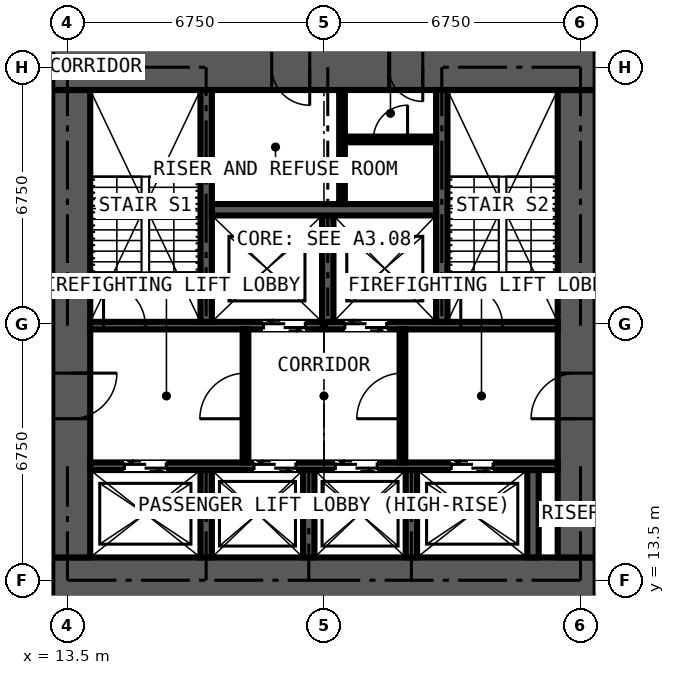
"""IFC4 building model, lengths in metres.
Left out: names, types, materials, properties, quantities, classifications, styles, units other than length and angle.
Written with IfcOpenShell. Run it as: python <this file> out.ifc"""

import sys

from ifc_helpers import new_model, si_unit, direction, frame, frame_2d, origin, place, context, subcontext, project, spatial, rectangle, extrude, element, fill, save


model = new_model("IFC4")
c1 = context("Model", 3, precision=1e-05, world=origin(), true_north=direction((0.0, 1.0)))
c2 = subcontext(c1, "Body", "Model", "MODEL_VIEW")
j1 = project(units=[si_unit("LENGTHUNIT", "METRE"), si_unit("PLANEANGLEUNIT", "RADIAN")], contexts=[c1])
p1 = place(None, origin())
s1 = spatial("IfcSite", under=j1, at=p1, CompositionType="ELEMENT")
p2 = place(p1, origin())
s2 = spatial("IfcBuilding", under=s1, at=p2, CompositionType="ELEMENT")
p3 = place(p2, frame((0.0, 0.0, 192.6)))
s3 = spatial("IfcBuildingStorey", under=s2, at=p3, CompositionType="ELEMENT", Elevation=192.6)
p4 = place(p3, frame((13.1, 13.5, 0.0), z_axis=(0.0, 0.0, 1.0), x_axis=(1.0, 0.0, 0.0)))
e1 = element("IfcWall", 1, at=p4, inside=s3, PredefinedType="SHEAR", context=c2, shape_type="SweptSolid", body=[
    extrude(rectangle(XDim=14.3, YDim=1.2, at=frame_2d((7.15, 0.0))), origin(), (0.0, 0.0, 1.0), 3.6),
])
p5 = place(p3, frame((26.9, 14.1, 0.0), z_axis=(0.0, 0.0, 1.0), x_axis=(0.0, 1.0, 0.0)))
e2 = element("IfcWall", 2, at=p5, inside=s3, PredefinedType="SHEAR", context=c2, shape_type="SweptSolid", body=[
    extrude(rectangle(XDim=12.3, YDim=1.0, at=frame_2d((6.15, 0.0))), origin(), (0.0, 0.0, 1.0), 3.6),
])
p6 = place(p5, frame((3.65, 0.0, 0.0)))
e3 = element("IfcOpeningElement", 3, at=p6, cuts=e2, PredefinedType="OPENING", context=c2, shape_type="SweptSolid", body=[
    extrude(rectangle(XDim=1.2, YDim=2.2, at=frame_2d((0.6, 1.1))), frame((0.0, 0.51, 0.0), z_axis=(0.0, -1.0, 0.0), x_axis=(1.0, 0.0, 0.0)), (0.0, 0.0, 1.0), 1.02),
])
p7 = place(p3, frame((27.4, 27.0, 0.0), z_axis=(0.0, 0.0, 1.0), x_axis=(-1.0, 0.0, 0.0)))
e4 = element("IfcWall", 4, at=p7, inside=s3, PredefinedType="SHEAR", context=c2, shape_type="SweptSolid", body=[
    extrude(rectangle(XDim=14.3, YDim=1.2, at=frame_2d((7.15, 0.0))), origin(), (0.0, 0.0, 1.0), 3.6),
])
p8 = place(p7, frame((4.55, 0.0, 0.0)))
e5 = element("IfcOpeningElement", 5, at=p8, cuts=e4, PredefinedType="OPENING", context=c2, shape_type="SweptSolid", body=[
    extrude(rectangle(XDim=0.9, YDim=2.2, at=frame_2d((0.45, 1.1))), frame((0.0, 0.61, 0.0), z_axis=(0.0, -1.0, 0.0), x_axis=(1.0, 0.0, 0.0)), (0.0, 0.0, 1.0), 1.22),
])
p9 = place(p7, frame((7.525, 0.0, 0.0)))
e6 = element("IfcOpeningElement", 6, at=p9, cuts=e4, PredefinedType="OPENING", context=c2, shape_type="SweptSolid", body=[
    extrude(rectangle(XDim=1.0, YDim=2.2, at=frame_2d((0.5, 1.1))), frame((0.0, 0.61, 0.0), z_axis=(0.0, -1.0, 0.0), x_axis=(1.0, 0.0, 0.0)), (0.0, 0.0, 1.0), 1.22),
])
p10 = place(p3, frame((13.6, 26.4, 0.0), z_axis=(0.0, 0.0, 1.0), x_axis=(0.0, -1.0, 0.0)))
e7 = element("IfcWall", 7, at=p10, inside=s3, PredefinedType="SHEAR", context=c2, shape_type="SweptSolid", body=[
    extrude(rectangle(XDim=12.3, YDim=1.0, at=frame_2d((6.15, 0.0))), origin(), (0.0, 0.0, 1.0), 3.6),
])
p11 = place(p10, frame((7.45, 0.0, 0.0)))
e8 = element("IfcOpeningElement", 8, at=p11, cuts=e7, PredefinedType="OPENING", context=c2, shape_type="SweptSolid", body=[
    extrude(rectangle(XDim=1.2, YDim=2.2, at=frame_2d((0.6, 1.1))), frame((0.0, 0.51, 0.0), z_axis=(0.0, -1.0, 0.0), x_axis=(1.0, 0.0, 0.0)), (0.0, 0.0, 1.0), 1.02),
])
p12 = place(p3, frame((14.1, 16.5, 0.0), z_axis=(0.0, 0.0, 1.0), x_axis=(1.0, 0.0, 0.0)))
e9 = element("IfcWall", 9, at=p12, inside=s3, PredefinedType="SHEAR", context=c2, shape_type="SweptSolid", body=[
    extrude(rectangle(XDim=12.3, YDim=0.2, at=frame_2d((6.15, 0.0))), origin(), (0.0, 0.0, 1.0), 3.6),
])
p13 = place(p12, frame((0.9, 0.0, 0.0)))
e10 = element("IfcOpeningElement", 10, at=p13, cuts=e9, PredefinedType="OPENING", context=c2, shape_type="SweptSolid", body=[
    extrude(rectangle(XDim=1.1, YDim=2.2, at=frame_2d((0.55, 1.1))), frame((0.0, 0.11, 0.0), z_axis=(0.0, -1.0, 0.0), x_axis=(1.0, 0.0, 0.0)), (0.0, 0.0, 1.0), 0.22),
])
p14 = place(p12, frame((4.31, 0.0, 0.0)))
e11 = element("IfcOpeningElement", 11, at=p14, cuts=e9, PredefinedType="OPENING", context=c2, shape_type="SweptSolid", body=[
    extrude(rectangle(XDim=1.1, YDim=2.2, at=frame_2d((0.55, 1.1))), frame((0.0, 0.11, 0.0), z_axis=(0.0, -1.0, 0.0), x_axis=(1.0, 0.0, 0.0)), (0.0, 0.0, 1.0), 0.22),
])
p15 = place(p12, frame((6.45, 0.0, 0.0)))
e12 = element("IfcOpeningElement", 12, at=p15, cuts=e9, PredefinedType="OPENING", context=c2, shape_type="SweptSolid", body=[
    extrude(rectangle(XDim=1.1, YDim=2.2, at=frame_2d((0.55, 1.1))), frame((0.0, 0.11, 0.0), z_axis=(0.0, -1.0, 0.0), x_axis=(1.0, 0.0, 0.0)), (0.0, 0.0, 1.0), 0.22),
])
p16 = place(p12, frame((9.5, 0.0, 0.0)))
e13 = element("IfcOpeningElement", 13, at=p16, cuts=e9, PredefinedType="OPENING", context=c2, shape_type="SweptSolid", body=[
    extrude(rectangle(XDim=1.1, YDim=2.2, at=frame_2d((0.55, 1.1))), frame((0.0, 0.11, 0.0), z_axis=(0.0, -1.0, 0.0), x_axis=(1.0, 0.0, 0.0)), (0.0, 0.0, 1.0), 0.22),
])
p17 = place(p3, frame((14.1, 20.2, 0.0), z_axis=(0.0, 0.0, 1.0), x_axis=(1.0, 0.0, 0.0)))
e14 = element("IfcWall", 14, at=p17, inside=s3, PredefinedType="SHEAR", context=c2, shape_type="SweptSolid", body=[
    extrude(rectangle(XDim=12.3, YDim=0.2, at=frame_2d((6.15, 0.0))), origin(), (0.0, 0.0, 1.0), 3.6),
])
p18 = place(p17, frame((4.56, 0.0, 0.0)))
e15 = element("IfcOpeningElement", 15, at=p18, cuts=e14, PredefinedType="OPENING", context=c2, shape_type="SweptSolid", body=[
    extrude(rectangle(XDim=1.1, YDim=2.2, at=frame_2d((0.55, 1.1))), frame((0.0, 0.11, 0.0), z_axis=(0.0, -1.0, 0.0), x_axis=(1.0, 0.0, 0.0)), (0.0, 0.0, 1.0), 0.22),
])
p19 = place(p17, frame((6.7, 0.0, 0.0)))
e16 = element("IfcOpeningElement", 16, at=p19, cuts=e14, PredefinedType="OPENING", context=c2, shape_type="SweptSolid", body=[
    extrude(rectangle(XDim=1.1, YDim=2.2, at=frame_2d((0.55, 1.1))), frame((0.0, 0.11, 0.0), z_axis=(0.0, -1.0, 0.0), x_axis=(1.0, 0.0, 0.0)), (0.0, 0.0, 1.0), 0.22),
])
p20 = place(p17, frame((0.35, 0.0, 0.0)))
e17 = element("IfcOpeningElement", 17, at=p20, cuts=e14, PredefinedType="OPENING", context=c2, shape_type="SweptSolid", body=[
    extrude(rectangle(XDim=1.1, YDim=2.2, at=frame_2d((0.55, 1.1))), frame((0.0, 0.11, 0.0), z_axis=(0.0, -1.0, 0.0), x_axis=(1.0, 0.0, 0.0)), (0.0, 0.0, 1.0), 0.22),
])
p21 = place(p17, frame((9.75, 0.0, 0.0)))
e18 = element("IfcOpeningElement", 18, at=p21, cuts=e14, PredefinedType="OPENING", context=c2, shape_type="SweptSolid", body=[
    extrude(rectangle(XDim=1.1, YDim=2.2, at=frame_2d((0.55, 1.1))), frame((0.0, 0.11, 0.0), z_axis=(0.0, -1.0, 0.0), x_axis=(1.0, 0.0, 0.0)), (0.0, 0.0, 1.0), 0.22),
])
for number, where, z_axis, x_axis in (
    (19, (17.15, 20.3, 0.0), (0.0, 0.0, 1.0), (0.0, 1.0, 0.0)),
    (20, (23.35, 20.3, 0.0), (0.0, 0.0, 1.0), (0.0, 1.0, 0.0)),
):
    element("IfcWall", number, at=place(p3, frame(where, z_axis=z_axis, x_axis=x_axis)), inside=s3, PredefinedType="SHEAR", context=c2, shape_type="SweptSolid", body=[
        extrude(rectangle(XDim=6.1, YDim=0.3, at=frame_2d((3.05, 0.0))), origin(), (0.0, 0.0, 1.0), 3.6),
    ])
p22 = place(p3, frame((20.35, 20.3, 0.0), z_axis=(0.0, 0.0, 1.0), x_axis=(0.0, 1.0, 0.0)))
e21 = element("IfcWall", 21, at=p22, inside=s3, PredefinedType="SHEAR", context=c2, shape_type="SweptSolid", body=[
    extrude(rectangle(XDim=2.8, YDim=0.3, at=frame_2d((1.4, 0.0))), origin(), (0.0, 0.0, 1.0), 3.6),
])
p23 = place(p3, frame((17.3, 23.25, 0.0), z_axis=(0.0, 0.0, 1.0), x_axis=(1.0, 0.0, 0.0)))
e22 = element("IfcWall", 22, at=p23, inside=s3, PredefinedType="SHEAR", context=c2, shape_type="SweptSolid", body=[
    extrude(rectangle(XDim=5.9, YDim=0.3, at=frame_2d((2.95, 0.0))), origin(), (0.0, 0.0, 1.0), 3.6),
])
for number, where, z_axis, x_axis in (
    (23, (17.15, 14.1, 0.0), (0.0, 0.0, 1.0), (0.0, 1.0, 0.0)),
    (24, (19.85, 14.1, 0.0), (0.0, 0.0, 1.0), (0.0, 1.0, 0.0)),
    (25, (22.55, 14.1, 0.0), (0.0, 0.0, 1.0), (0.0, 1.0, 0.0)),
    (26, (25.75, 14.1, 0.0), (0.0, 0.0, 1.0), (0.0, 1.0, 0.0)),
):
    element("IfcWall", number, at=place(p3, frame(where, z_axis=z_axis, x_axis=x_axis)), inside=s3, PredefinedType="SHEAR", context=c2, shape_type="SweptSolid", body=[
        extrude(rectangle(XDim=2.3, YDim=0.3, at=frame_2d((1.15, 0.0))), origin(), (0.0, 0.0, 1.0), 3.6),
    ])
p24 = place(p3, frame((18.185, 16.6, 0.0), z_axis=(0.0, 0.0, 1.0), x_axis=(0.0, 1.0, 0.0)))
e27 = element("IfcWall", 27, at=p24, inside=s3, PredefinedType="PARTITIONING", context=c2, shape_type="SweptSolid", body=[
    extrude(rectangle(XDim=3.5, YDim=0.15, at=frame_2d((1.75, 0.0))), origin(), (0.0, 0.0, 1.0), 3.375),
])
p25 = place(p24, frame((1.15, 0.0, 0.0)))
e28 = element("IfcOpeningElement", 28, at=p25, cuts=e27, PredefinedType="OPENING", context=c2, shape_type="SweptSolid", body=[
    extrude(rectangle(XDim=1.2, YDim=2.2, at=frame_2d((0.6, 1.1))), frame((0.0, 0.085, 0.0), z_axis=(0.0, -1.0, 0.0), x_axis=(1.0, 0.0, 0.0)), (0.0, 0.0, 1.0), 0.17),
])
p26 = place(p3, frame((22.315, 16.6, 0.0), z_axis=(0.0, 0.0, 1.0), x_axis=(0.0, 1.0, 0.0)))
e29 = element("IfcWall", 29, at=p26, inside=s3, PredefinedType="PARTITIONING", context=c2, shape_type="SweptSolid", body=[
    extrude(rectangle(XDim=3.5, YDim=0.15, at=frame_2d((1.75, 0.0))), origin(), (0.0, 0.0, 1.0), 3.375),
])
p27 = place(p26, frame((1.15, 0.0, 0.0)))
e30 = element("IfcOpeningElement", 30, at=p27, cuts=e29, PredefinedType="OPENING", context=c2, shape_type="SweptSolid", body=[
    extrude(rectangle(XDim=1.2, YDim=2.2, at=frame_2d((0.6, 1.1))), frame((0.0, 0.085, 0.0), z_axis=(0.0, -1.0, 0.0), x_axis=(1.0, 0.0, 0.0)), (0.0, 0.0, 1.0), 0.17),
])
p28 = place(p3, frame((20.725, 23.4, 0.0), z_axis=(0.0, 0.0, 1.0), x_axis=(0.0, 1.0, 0.0)))
e31 = element("IfcWall", 31, at=p28, inside=s3, PredefinedType="PARTITIONING", context=c2, shape_type="SweptSolid", body=[
    extrude(rectangle(XDim=3.0, YDim=0.15, at=frame_2d((1.5, 0.0))), origin(), (0.0, 0.0, 1.0), 3.375),
])
p29 = place(p3, frame((20.8, 25.1, 0.0), z_axis=(0.0, 0.0, 1.0), x_axis=(1.0, 0.0, 0.0)))
e32 = element("IfcWall", 32, at=p29, inside=s3, PredefinedType="PARTITIONING", context=c2, shape_type="SweptSolid", body=[
    extrude(rectangle(XDim=2.4, YDim=0.15, at=frame_2d((1.2, 0.0))), origin(), (0.0, 0.0, 1.0), 3.375),
])
p30 = place(p29, frame((0.75, 0.0, 0.0)))
e33 = element("IfcOpeningElement", 33, at=p30, cuts=e32, PredefinedType="OPENING", context=c2, shape_type="SweptSolid", body=[
    extrude(rectangle(XDim=0.9, YDim=2.2, at=frame_2d((0.45, 1.1))), frame((0.0, 0.085, 0.0), z_axis=(0.0, -1.0, 0.0), x_axis=(1.0, 0.0, 0.0)), (0.0, 0.0, 1.0), 0.17),
])
p31 = place(p13, origin())
e34 = element("IfcDoor", 34, at=p31, inside=s3, OperationType="DOUBLE_DOOR_SLIDING", PredefinedType="DOOR", context=c2, shape_type="SweptSolid", body=[
    extrude(rectangle(XDim=1.1, YDim=2.2, at=frame_2d((0.55, 1.1))), frame((0.0, 0.025, 0.0), z_axis=(0.0, -1.0, 0.0), x_axis=(1.0, 0.0, 0.0)), (0.0, 0.0, 1.0), 0.05),
])
fill(e10, e34)
p32 = place(p14, origin())
e35 = element("IfcDoor", 35, at=p32, inside=s3, OperationType="DOUBLE_DOOR_SLIDING", PredefinedType="DOOR", context=c2, shape_type="SweptSolid", body=[
    extrude(rectangle(XDim=1.1, YDim=2.2, at=frame_2d((0.55, 1.1))), frame((0.0, 0.025, 0.0), z_axis=(0.0, -1.0, 0.0), x_axis=(1.0, 0.0, 0.0)), (0.0, 0.0, 1.0), 0.05),
])
fill(e11, e35)
p33 = place(p15, origin())
e36 = element("IfcDoor", 36, at=p33, inside=s3, OperationType="DOUBLE_DOOR_SLIDING", PredefinedType="DOOR", context=c2, shape_type="SweptSolid", body=[
    extrude(rectangle(XDim=1.1, YDim=2.2, at=frame_2d((0.55, 1.1))), frame((0.0, 0.025, 0.0), z_axis=(0.0, -1.0, 0.0), x_axis=(1.0, 0.0, 0.0)), (0.0, 0.0, 1.0), 0.05),
])
fill(e12, e36)
p34 = place(p16, origin())
e37 = element("IfcDoor", 37, at=p34, inside=s3, OperationType="DOUBLE_DOOR_SLIDING", PredefinedType="DOOR", context=c2, shape_type="SweptSolid", body=[
    extrude(rectangle(XDim=1.1, YDim=2.2, at=frame_2d((0.55, 1.1))), frame((0.0, 0.025, 0.0), z_axis=(0.0, -1.0, 0.0), x_axis=(1.0, 0.0, 0.0)), (0.0, 0.0, 1.0), 0.05),
])
fill(e13, e37)
p35 = place(p18, origin())
e38 = element("IfcDoor", 38, at=p35, inside=s3, OperationType="DOUBLE_DOOR_SLIDING", PredefinedType="DOOR", context=c2, shape_type="SweptSolid", body=[
    extrude(rectangle(XDim=1.1, YDim=2.2, at=frame_2d((0.55, 1.1))), frame((0.0, 0.025, 0.0), z_axis=(0.0, -1.0, 0.0), x_axis=(1.0, 0.0, 0.0)), (0.0, 0.0, 1.0), 0.05),
])
fill(e15, e38)
p36 = place(p19, origin())
e39 = element("IfcDoor", 39, at=p36, inside=s3, OperationType="DOUBLE_DOOR_SLIDING", PredefinedType="DOOR", context=c2, shape_type="SweptSolid", body=[
    extrude(rectangle(XDim=1.1, YDim=2.2, at=frame_2d((0.55, 1.1))), frame((0.0, 0.025, 0.0), z_axis=(0.0, -1.0, 0.0), x_axis=(1.0, 0.0, 0.0)), (0.0, 0.0, 1.0), 0.05),
])
fill(e16, e39)
p37 = place(p11, origin())
e40 = element("IfcDoor", 40, at=p37, inside=s3, OperationType="DOUBLE_DOOR_SINGLE_SWING", PredefinedType="DOOR", context=c2, shape_type="SweptSolid", body=[
    extrude(rectangle(XDim=1.2, YDim=2.2, at=frame_2d((0.6, 1.1))), frame((0.0, 0.025, 0.0), z_axis=(0.0, -1.0, 0.0), x_axis=(1.0, 0.0, 0.0)), (0.0, 0.0, 1.0), 0.05),
])
fill(e8, e40)
p38 = place(p6, origin())
e41 = element("IfcDoor", 41, at=p38, inside=s3, OperationType="DOUBLE_DOOR_SINGLE_SWING", PredefinedType="DOOR", context=c2, shape_type="SweptSolid", body=[
    extrude(rectangle(XDim=1.2, YDim=2.2, at=frame_2d((0.6, 1.1))), frame((0.0, 0.025, 0.0), z_axis=(0.0, -1.0, 0.0), x_axis=(1.0, 0.0, 0.0)), (0.0, 0.0, 1.0), 0.05),
])
fill(e3, e41)
p39 = place(p25, origin())
e42 = element("IfcDoor", 42, at=p39, inside=s3, OperationType="DOUBLE_DOOR_SINGLE_SWING", PredefinedType="DOOR", context=c2, shape_type="SweptSolid", body=[
    extrude(rectangle(XDim=1.2, YDim=2.2, at=frame_2d((0.6, 1.1))), frame((0.0, 0.025, 0.0), z_axis=(0.0, -1.0, 0.0), x_axis=(1.0, 0.0, 0.0)), (0.0, 0.0, 1.0), 0.05),
])
fill(e28, e42)
p40 = place(p27, origin())
e43 = element("IfcDoor", 43, at=p40, inside=s3, OperationType="DOUBLE_DOOR_SINGLE_SWING", PredefinedType="DOOR", context=c2, shape_type="SweptSolid", body=[
    extrude(rectangle(XDim=1.2, YDim=2.2, at=frame_2d((0.6, 1.1))), frame((0.0, 0.025, 0.0), z_axis=(0.0, -1.0, 0.0), x_axis=(1.0, 0.0, 0.0)), (0.0, 0.0, 1.0), 0.05),
])
fill(e30, e43)
p41 = place(p30, origin())
e44 = element("IfcDoor", 44, at=p41, inside=s3, OperationType="SINGLE_SWING_RIGHT", PredefinedType="DOOR", context=c2, shape_type="SweptSolid", body=[
    extrude(rectangle(XDim=0.9, YDim=2.2, at=frame_2d((0.45, 1.1))), frame((0.0, 0.025, 0.0), z_axis=(0.0, -1.0, 0.0), x_axis=(1.0, 0.0, 0.0)), (0.0, 0.0, 1.0), 0.05),
])
fill(e33, e44)
p42 = place(p8, origin())
e45 = element("IfcDoor", 45, at=p42, inside=s3, OperationType="SINGLE_SWING_LEFT", PredefinedType="DOOR", context=c2, shape_type="SweptSolid", body=[
    extrude(rectangle(XDim=0.9, YDim=2.2, at=frame_2d((0.45, 1.1))), frame((0.0, 0.4, 0.0), z_axis=(0.0, -1.0, 0.0), x_axis=(1.0, 0.0, 0.0)), (0.0, 0.0, 1.0), 0.8),
])
fill(e5, e45)
p43 = place(p9, origin())
e46 = element("IfcDoor", 46, at=p43, inside=s3, OperationType="SINGLE_SWING_LEFT", PredefinedType="DOOR", context=c2, shape_type="SweptSolid", body=[
    extrude(rectangle(XDim=1.0, YDim=2.2, at=frame_2d((0.5, 1.1))), frame((0.0, 0.025, 0.0), z_axis=(0.0, -1.0, 0.0), x_axis=(1.0, 0.0, 0.0)), (0.0, 0.0, 1.0), 0.05),
])
fill(e6, e46)
p44 = place(p20, origin())
e47 = element("IfcDoor", 47, at=p44, inside=s3, OperationType="SINGLE_SWING_LEFT", PredefinedType="DOOR", context=c2, shape_type="SweptSolid", body=[
    extrude(rectangle(XDim=1.1, YDim=2.2, at=frame_2d((0.55, 1.1))), frame((0.0, 0.025, 0.0), z_axis=(0.0, -1.0, 0.0), x_axis=(1.0, 0.0, 0.0)), (0.0, 0.0, 1.0), 0.05),
])
fill(e17, e47)
p45 = place(p21, origin())
e48 = element("IfcDoor", 48, at=p45, inside=s3, OperationType="SINGLE_SWING_LEFT", PredefinedType="DOOR", context=c2, shape_type="SweptSolid", body=[
    extrude(rectangle(XDim=1.1, YDim=2.2, at=frame_2d((0.55, 1.1))), frame((0.0, 0.025, 0.0), z_axis=(0.0, -1.0, 0.0), x_axis=(1.0, 0.0, 0.0)), (0.0, 0.0, 1.0), 0.05),
])
fill(e18, e48)
save(model, sys.argv[1])
